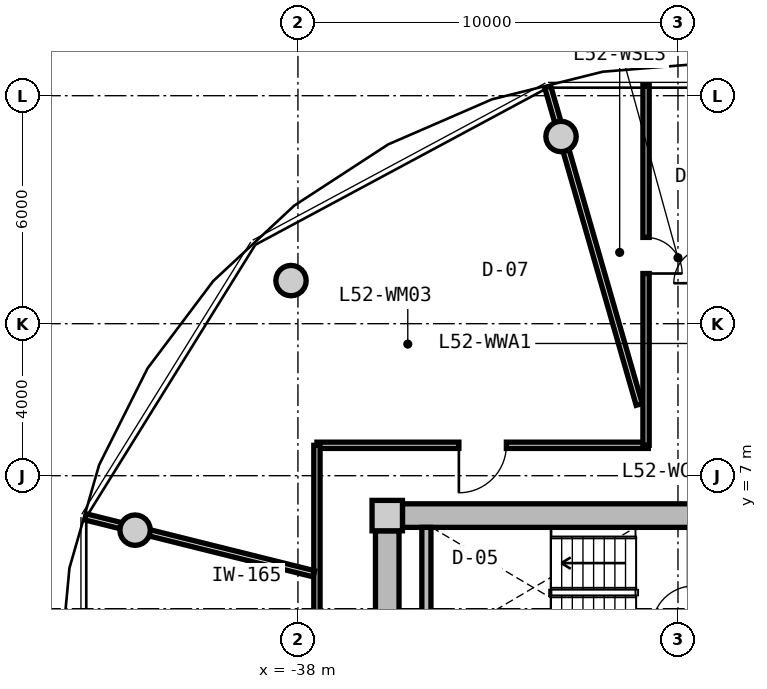
"""IFC4 building model, lengths in metres.
Left out: names, types, materials, properties, quantities, classifications, styles, units other than length and angle.
Written with IfcOpenShell. Run it as: python <this file> out.ifc"""

import sys

from ifc_helpers import new_model, si_unit, direction, frame, frame_2d, origin, origin_2d, place, context, subcontext, project, spatial, rectangle, circle, extrude, source, transform, mapped, element, fill, save


model = new_model("IFC4")
c1 = context("Model", 3, precision=1e-05, world=origin(), true_north=direction((0.0, 1.0)))
c2 = subcontext(c1, "Body", "Model", "MODEL_VIEW")
j1 = project(units=[si_unit("LENGTHUNIT", "METRE"), si_unit("PLANEANGLEUNIT", "RADIAN")], contexts=[c1])
p1 = place(None, origin())
s1 = spatial("IfcSite", under=j1, at=p1, CompositionType="ELEMENT")
p2 = place(p1, origin())
s2 = spatial("IfcBuilding", under=s1, at=p2, CompositionType="ELEMENT")
p3 = place(p2, frame((0.0, 0.0, 167.85)))
s3 = spatial("IfcBuildingStorey", under=s2, at=p3, CompositionType="ELEMENT", Elevation=167.85)
m1 = source(origin(), c2, "Body", "SweptSolid", [
    extrude(rectangle(XDim=0.8, YDim=0.8, at=origin_2d()), origin(), (0.0, 0.0, 1.0), 3.05),
])
p4 = place(p3, frame((-35.65, 5.95, 0.0), z_axis=(0.0, 0.0, 1.0), x_axis=(1.0, 0.0, 0.0)))
e1 = element("IfcColumn", 1, at=p4, inside=s3, PredefinedType="COLUMN", context=c2, shape_type="MappedRepresentation", body=[
    mapped(m1, transform((0.0, 0.0, 0.0), x_axis=(1.0, 0.0, 0.0), y_axis=(0.0, 1.0, 0.0), z_axis=(0.0, 0.0, 1.0), scale=1.0)),
])
m2 = source(origin(), c2, "Body", "SweptSolid", [
    extrude(rectangle(XDim=14.5, YDim=0.62, at=frame_2d((7.25, 0.0))), origin(), (0.0, 0.0, 1.0), 2.81),
])
p5 = place(p3, frame((-35.25, 5.95, 0.0), z_axis=(0.0, 0.0, 1.0), x_axis=(1.0, 0.0, 0.0)))
e2 = element("IfcWall", 2, at=p5, inside=s3, PredefinedType="SHEAR", context=c2, shape_type="MappedRepresentation", body=[
    mapped(m2, transform((0.0, 0.0, 0.0), x_axis=(1.0, 0.0, 0.0), y_axis=(0.0, 1.0, 0.0), z_axis=(0.0, 0.0, 1.0), scale=1.0)),
])
m3 = source(origin(), c2, "Body", "SweptSolid", [
    extrude(rectangle(XDim=11.1, YDim=0.62, at=frame_2d((5.55, 0.0))), origin(), (0.0, 0.0, 1.0), 2.81),
])
p6 = place(p3, frame((-35.65, -5.55, 0.0), z_axis=(0.0, 0.0, 1.0), x_axis=(0.0, 1.0, 0.0)))
e3 = element("IfcWall", 3, at=p6, inside=s3, PredefinedType="SHEAR", context=c2, shape_type="MappedRepresentation", body=[
    mapped(m3, transform((0.0, 0.0, 0.0), x_axis=(1.0, 0.0, 0.0), y_axis=(0.0, 1.0, 0.0), z_axis=(0.0, 0.0, 1.0), scale=1.0)),
])
p7 = place(p6, frame((3.8, 0.0, 0.0)))
e4 = element("IfcOpeningElement", 4, at=p7, cuts=e3, PredefinedType="OPENING", context=c2, shape_type="SweptSolid", body=[
    extrude(rectangle(XDim=1.2, YDim=2.15, at=frame_2d((0.6, 1.075))), frame((0.0, 0.32, 0.0), z_axis=(0.0, -1.0, 0.0), x_axis=(1.0, 0.0, 0.0)), (0.0, 0.0, 1.0), 0.64),
])
m4 = source(origin(), c2, "Body", "SweptSolid", [
    extrude(circle(Radius=0.4, at=origin_2d()), origin(), (0.0, 0.0, 1.0), 3.05),
])
for number, where, z_axis, x_axis in (
    (5, (-31.077, 15.926, 0.0), (0.0, 0.0, 1.0), (1.0, 0.0, 0.0)),
    (6, (-38.183, 12.135, 0.0), (0.0, 0.0, 1.0), (1.0, 0.0, 0.0)),
    (7, (-42.285, 5.567, 0.0), (0.0, 0.0, 1.0), (1.0, 0.0, 0.0)),
):
    element("IfcColumn", number, at=place(p3, frame(where, z_axis=z_axis, x_axis=x_axis)), inside=s3, PredefinedType="COLUMN", context=c2, shape_type="MappedRepresentation", body=[
        mapped(m4, transform((0.0, 0.0, 0.0), x_axis=(1.0, 0.0, 0.0), y_axis=(0.0, 1.0, 0.0), z_axis=(0.0, 0.0, 1.0), scale=1.0)),
    ])
m5 = source(origin(), c2, "Body", "SweptSolid", [
    extrude(rectangle(XDim=3.19, YDim=0.24, at=frame_2d((1.595, 0.0))), origin(), (0.0, 0.0, 1.0), 2.81),
])
p8 = place(p3, frame((-34.62, 2.45, 0.0), z_axis=(0.0, 0.0, 1.0), x_axis=(0.0, 1.0, 0.0)))
e8 = element("IfcWall", 8, at=p8, inside=s3, PredefinedType="PARTITIONING", context=c2, shape_type="MappedRepresentation", body=[
    mapped(m5, transform((0.0, 0.0, 0.0), x_axis=(1.0, 0.0, 0.0), y_axis=(0.0, 1.0, 0.0), z_axis=(0.0, 0.0, 1.0), scale=1.0)),
])
m6 = source(origin(), c2, "Body", "SweptSolid", [
    extrude(rectangle(XDim=8.719, YDim=0.165, at=frame_2d((4.36, 0.0))), origin(), (0.0, 0.0, 1.0), 2.795),
])
p9 = place(p3, frame((-37.5, 7.8, 0.0), z_axis=(0.0, 0.0, 1.0), x_axis=(1.0, 0.0, 0.0)))
e9 = element("IfcWall", 9, at=p9, inside=s3, PredefinedType="PARTITIONING", context=c2, shape_type="MappedRepresentation", body=[
    mapped(m6, transform((0.0, 0.0, 0.0), x_axis=(1.0, 0.0, 0.0), y_axis=(0.0, 1.0, 0.0), z_axis=(0.0, 0.0, 1.0), scale=1.0)),
])
p10 = place(p9, frame((3.735, 0.0, 0.0)))
e10 = element("IfcOpeningElement", 10, at=p10, cuts=e9, PredefinedType="OPENING", context=c2, shape_type="SweptSolid", body=[
    extrude(rectangle(XDim=1.25, YDim=2.2, at=frame_2d((0.625, 1.1))), frame((0.0, 0.093, 0.0), z_axis=(0.0, -1.0, 0.0), x_axis=(1.0, 0.0, 0.0)), (0.0, 0.0, 1.0), 0.185),
])
m7 = source(origin(), c2, "Body", "SweptSolid", [
    extrude(rectangle(XDim=6.88, YDim=0.165, at=frame_2d((3.44, 0.0))), origin(), (0.0, 0.0, 1.0), 2.795),
])
p11 = place(p3, frame((-37.5, 0.92, 0.0), z_axis=(0.0, 0.0, 1.0), x_axis=(0.0, 1.0, 0.0)))
e11 = element("IfcWall", 11, at=p11, inside=s3, PredefinedType="PARTITIONING", context=c2, shape_type="MappedRepresentation", body=[
    mapped(m7, transform((0.0, 0.0, 0.0), x_axis=(1.0, 0.0, 0.0), y_axis=(0.0, 1.0, 0.0), z_axis=(0.0, 0.0, 1.0), scale=1.0)),
])
m8 = source(origin(), c2, "Body", "SweptSolid", [
    extrude(rectangle(XDim=8.695, YDim=0.165, at=frame_2d((4.348, 0.0))), origin(), (0.0, 0.0, 1.0), 2.345),
])
p12 = place(p3, frame((-29.02, 8.875, 0.0), z_axis=(0.0, 0.0, 1.0), x_axis=(-0.276797231892, 0.960928349263, 0.0)))
e12 = element("IfcWall", 12, at=p12, inside=s3, PredefinedType="PARTITIONING", context=c2, shape_type="MappedRepresentation", body=[
    mapped(m8, transform((0.0, 0.0, 0.0), x_axis=(1.0, 0.0, 0.0), y_axis=(0.0, 1.0, 0.0), z_axis=(0.0, 0.0, 1.0), scale=1.0)),
])
m9 = source(origin(), c2, "Body", "SweptSolid", [
    extrude(rectangle(XDim=6.193, YDim=0.165, at=frame_2d((3.096, 0.0))), origin(), (0.0, 0.0, 1.0), 2.345),
])
p13 = place(p3, frame((-37.58, 4.419, 0.0), z_axis=(0.0, 0.0, 1.0), x_axis=(-0.970309243466, 0.241867674657, 0.0)))
e13 = element("IfcWall", 13, at=p13, inside=s3, PredefinedType="PARTITIONING", context=c2, shape_type="MappedRepresentation", body=[
    mapped(m9, transform((0.0, 0.0, 0.0), x_axis=(1.0, 0.0, 0.0), y_axis=(0.0, 1.0, 0.0), z_axis=(0.0, 0.0, 1.0), scale=1.0)),
])
m10 = source(origin(), c2, "Body", "SweptSolid", [
    extrude(rectangle(XDim=9.48, YDim=0.165, at=frame_2d((4.74, 0.0))), origin(), (0.0, 0.0, 1.0), 2.795),
])
p14 = place(p3, frame((-28.84, 7.8, 0.0), z_axis=(0.0, 0.0, 1.0), x_axis=(0.0, 1.0, 0.0)))
e14 = element("IfcWall", 14, at=p14, inside=s3, PredefinedType="PARTITIONING", context=c2, shape_type="MappedRepresentation", body=[
    mapped(m10, transform((0.0, 0.0, 0.0), x_axis=(1.0, 0.0, 0.0), y_axis=(0.0, 1.0, 0.0), z_axis=(0.0, 0.0, 1.0), scale=1.0)),
])
p15 = place(p14, frame((4.521, 0.0, 0.0)))
e15 = element("IfcOpeningElement", 15, at=p15, cuts=e14, PredefinedType="OPENING", context=c2, shape_type="SweptSolid", body=[
    extrude(rectangle(XDim=0.95, YDim=2.1, at=frame_2d((0.475, 1.05))), frame((0.0, 0.093, 0.0), z_axis=(0.0, -1.0, 0.0), x_axis=(1.0, 0.0, 0.0)), (0.0, 0.0, 1.0), 0.185),
])
m11 = source(origin(), c2, "Body", "SweptSolid", [
    extrude(rectangle(XDim=0.95, YDim=2.1, at=frame_2d((0.475, 1.05))), frame((0.0, 0.025, 0.0), z_axis=(0.0, -1.0, 0.0), x_axis=(1.0, 0.0, 0.0)), (0.0, 0.0, 1.0), 0.05),
])
p16 = place(p15, frame((0.95, 0.0, 0.0), z_axis=(0.0, 0.0, 1.0), x_axis=(-1.0, 0.0, 0.0)))
e16 = element("IfcDoor", 16, at=p16, inside=s3, OperationType="SINGLE_SWING_RIGHT", PredefinedType="DOOR", context=c2, shape_type="MappedRepresentation", body=[
    mapped(m11, transform((0.0, 0.0, 0.0), x_axis=(1.0, 0.0, 0.0), y_axis=(0.0, 1.0, 0.0), z_axis=(0.0, 0.0, 1.0), scale=1.0)),
])
fill(e15, e16)
m12 = source(origin(), c2, "Body", "SweptSolid", [
    extrude(rectangle(XDim=1.25, YDim=2.2, at=frame_2d((0.625, 1.1))), frame((0.0, 0.025, 0.0), z_axis=(0.0, -1.0, 0.0), x_axis=(1.0, 0.0, 0.0)), (0.0, 0.0, 1.0), 0.05),
])
p17 = place(p10, frame((1.25, 0.0, 0.0), z_axis=(0.0, 0.0, 1.0), x_axis=(-1.0, 0.0, 0.0)))
e17 = element("IfcDoor", 17, at=p17, inside=s3, OperationType="SINGLE_SWING_RIGHT", PredefinedType="DOOR", context=c2, shape_type="MappedRepresentation", body=[
    mapped(m12, transform((0.0, 0.0, 0.0), x_axis=(1.0, 0.0, 0.0), y_axis=(0.0, 1.0, 0.0), z_axis=(0.0, 0.0, 1.0), scale=1.0)),
])
fill(e10, e17)
save(model, sys.argv[1])
